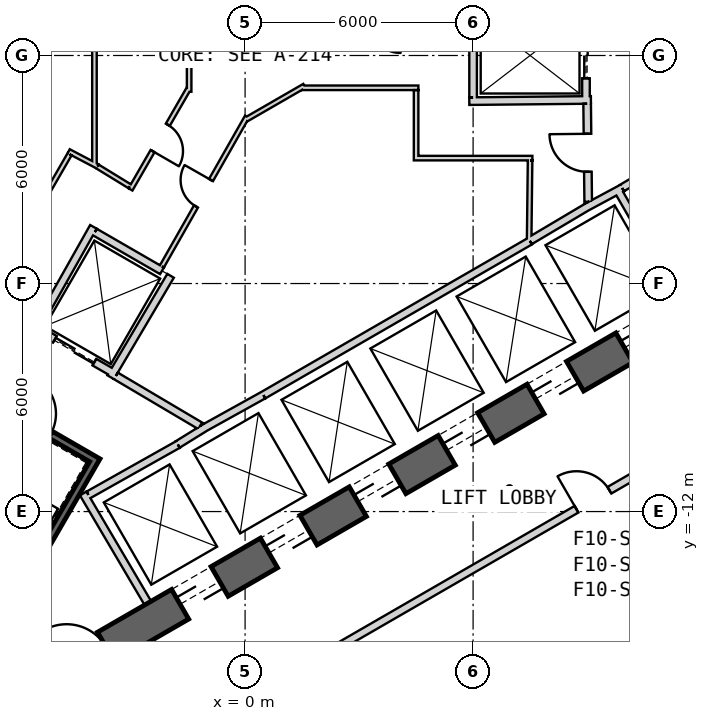
"""IFC4 building model, lengths in metres.
Left out: names, types, materials, properties, quantities, classifications, styles, units other than length and angle.
Written with IfcOpenShell. Run it as: python <this file> out.ifc"""

import sys

from ifc_helpers import new_model, si_unit, direction, frame, frame_2d, origin, place, context, subcontext, project, spatial, rectangle, extrude, element, fill, save


model = new_model("IFC4")
c1 = context("Model", 3, precision=1e-05, world=origin(), true_north=direction((0.0, 1.0)))
c2 = subcontext(c1, "Body", "Model", "MODEL_VIEW")
j1 = project(units=[si_unit("LENGTHUNIT", "METRE"), si_unit("PLANEANGLEUNIT", "RADIAN")], contexts=[c1])
p1 = place(None, origin())
s1 = spatial("IfcSite", under=j1, at=p1, CompositionType="ELEMENT")
p2 = place(p1, origin())
s2 = spatial("IfcBuilding", under=s1, at=p2, CompositionType="ELEMENT")
p3 = place(p2, frame((0.0, 0.0, 94.7)))
s3 = spatial("IfcBuildingStorey", under=s2, at=p3, CompositionType="ELEMENT", Elevation=94.7)
p4 = place(p3, frame((-7.825, -17.97, 0.0), z_axis=(0.0, 0.0, 1.0), x_axis=(0.866028369851, 0.499994862586, 0.0)))
e1 = element("IfcWall", 1, at=p4, inside=s3, PredefinedType="SHEAR", context=c2, shape_type="SweptSolid", body=[
    extrude(rectangle(XDim=31.523, YDim=0.9, at=frame_2d((15.762, 0.0))), origin(), (0.0, 0.0, 1.0), 4.1),
])
p5 = place(p4, frame((7.062, 0.0, 0.0)))
e2 = element("IfcOpeningElement", 2, at=p5, cuts=e1, PredefinedType="OPENING", context=c2, shape_type="SweptSolid", body=[
    extrude(rectangle(XDim=1.2, YDim=2.4, at=frame_2d((0.6, 1.2))), frame((0.0, 0.46, 0.0), z_axis=(0.0, -1.0, 0.0), x_axis=(1.0, 0.0, 0.0)), (0.0, 0.0, 1.0), 0.92),
])
p6 = place(p4, frame((9.762, 0.0, 0.0)))
e3 = element("IfcOpeningElement", 3, at=p6, cuts=e1, PredefinedType="OPENING", context=c2, shape_type="SweptSolid", body=[
    extrude(rectangle(XDim=1.2, YDim=2.4, at=frame_2d((0.6, 1.2))), frame((0.0, 0.46, 0.0), z_axis=(0.0, -1.0, 0.0), x_axis=(1.0, 0.0, 0.0)), (0.0, 0.0, 1.0), 0.92),
])
p7 = place(p4, frame((12.462, 0.0, 0.0)))
e4 = element("IfcOpeningElement", 4, at=p7, cuts=e1, PredefinedType="OPENING", context=c2, shape_type="SweptSolid", body=[
    extrude(rectangle(XDim=1.2, YDim=2.4, at=frame_2d((0.6, 1.2))), frame((0.0, 0.46, 0.0), z_axis=(0.0, -1.0, 0.0), x_axis=(1.0, 0.0, 0.0)), (0.0, 0.0, 1.0), 0.92),
])
p8 = place(p4, frame((15.162, 0.0, 0.0)))
e5 = element("IfcOpeningElement", 5, at=p8, cuts=e1, PredefinedType="OPENING", context=c2, shape_type="SweptSolid", body=[
    extrude(rectangle(XDim=1.2, YDim=2.4, at=frame_2d((0.6, 1.2))), frame((0.0, 0.46, 0.0), z_axis=(0.0, -1.0, 0.0), x_axis=(1.0, 0.0, 0.0)), (0.0, 0.0, 1.0), 0.92),
])
p9 = place(p4, frame((17.862, 0.0, 0.0)))
e6 = element("IfcOpeningElement", 6, at=p9, cuts=e1, PredefinedType="OPENING", context=c2, shape_type="SweptSolid", body=[
    extrude(rectangle(XDim=1.2, YDim=2.4, at=frame_2d((0.6, 1.2))), frame((0.0, 0.46, 0.0), z_axis=(0.0, -1.0, 0.0), x_axis=(1.0, 0.0, 0.0)), (0.0, 0.0, 1.0), 0.92),
])
p10 = place(p4, frame((20.562, 0.0, 0.0)))
e7 = element("IfcOpeningElement", 7, at=p10, cuts=e1, PredefinedType="OPENING", context=c2, shape_type="SweptSolid", body=[
    extrude(rectangle(XDim=1.2, YDim=2.4, at=frame_2d((0.6, 1.2))), frame((0.0, 0.46, 0.0), z_axis=(0.0, -1.0, 0.0), x_axis=(1.0, 0.0, 0.0)), (0.0, 0.0, 1.0), 0.92),
])
p11 = place(p4, frame((26.712, 0.0, 0.0)))
e8 = element("IfcOpeningElement", 8, at=p11, cuts=e1, PredefinedType="OPENING", context=c2, shape_type="SweptSolid", body=[
    extrude(rectangle(XDim=1.2, YDim=2.4, at=frame_2d((0.6, 1.2))), frame((0.0, 0.46, 0.0), z_axis=(0.0, -1.0, 0.0), x_axis=(1.0, 0.0, 0.0)), (0.0, 0.0, 1.0), 0.92),
])
p12 = place(p4, frame((3.612, 0.0, 0.0)))
e9 = element("IfcOpeningElement", 9, at=p12, cuts=e1, PredefinedType="OPENING", context=c2, shape_type="SweptSolid", body=[
    extrude(rectangle(XDim=1.2, YDim=2.4, at=frame_2d((0.6, 1.2))), frame((0.0, 0.46, 0.0), z_axis=(0.0, -1.0, 0.0), x_axis=(1.0, 0.0, 0.0)), (0.0, 0.0, 1.0), 0.92),
])
p13 = place(p3, frame((0.483, -8.936, 0.0), z_axis=(0.0, 0.0, 1.0), x_axis=(0.866030989016, 0.499990325971, 0.0)))
e10 = element("IfcWall", 10, at=p13, inside=s3, PredefinedType="PLUMBINGWALL", context=c2, shape_type="SweptSolid", body=[
    extrude(rectangle(XDim=8.1, YDim=0.2, at=frame_2d((4.05, 0.0))), origin(), (0.0, 0.0, 1.0), 3.8),
])
p14 = place(p3, frame((9.795, -3.525, 0.0), z_axis=(0.0, 0.0, 1.0), x_axis=(0.499984717929, -0.866034226713, 0.0)))
e11 = element("IfcWall", 11, at=p14, inside=s3, PredefinedType="PLUMBINGWALL", context=c2, shape_type="SweptSolid", body=[
    extrude(rectangle(XDim=3.25, YDim=0.2, at=frame_2d((1.625, 0.0))), origin(), (0.0, 0.0, 1.0), 3.8),
])
p15 = place(p3, frame((8.974, -3.999, 0.0), z_axis=(0.0, 0.0, 1.0), x_axis=(0.880907015104, 0.473289373154, 0.0)))
e12 = element("IfcWall", 12, at=p15, inside=s3, PredefinedType="PLUMBINGWALL", context=c2, shape_type="SweptSolid", body=[
    extrude(rectangle(XDim=1.078, YDim=0.2, at=frame_2d((0.539, 0.0))), origin(), (0.0, 0.0, 1.0), 3.8),
])
p16 = place(p3, frame((7.493, -4.878, 0.0), z_axis=(0.0, 0.0, 1.0), x_axis=(0.859981807212, 0.510324691999, 0.0)))
e13 = element("IfcWall", 13, at=p16, inside=s3, PredefinedType="PLUMBINGWALL", context=c2, shape_type="SweptSolid", body=[
    extrude(rectangle(XDim=1.845, YDim=0.2, at=frame_2d((0.922, 0.0))), origin(), (0.0, 0.0, 1.0), 3.8),
])
p17 = place(p3, frame((-2.558, -14.409, 0.0), z_axis=(0.0, 0.0, 1.0), x_axis=(-0.507997497166, 0.861358544901, 0.0)))
e14 = element("IfcWall", 14, at=p17, inside=s3, PredefinedType="PLUMBINGWALL", context=c2, shape_type="SweptSolid", body=[
    extrude(rectangle(XDim=3.35, YDim=0.2, at=frame_2d((1.675, 0.0))), origin(), (0.0, 0.0, 1.0), 3.8),
])
p18 = place(p3, frame((-1.769, -10.237, 0.0), z_axis=(0.0, 0.0, 1.0), x_axis=(-0.871534483978, -0.490334215854, 0.0)))
e15 = element("IfcWall", 15, at=p18, inside=s3, PredefinedType="PLUMBINGWALL", context=c2, shape_type="SweptSolid", body=[
    extrude(rectangle(XDim=2.7, YDim=0.2, at=frame_2d((1.35, 0.0))), origin(), (0.0, 0.0, 1.0), 3.8),
])
p19 = place(p3, frame((-1.024, -9.771, 0.0), z_axis=(0.0, 0.0, 1.0), x_axis=(-0.850348075135, -0.526220629693, 0.0)))
e16 = element("IfcWall", 16, at=p19, inside=s3, PredefinedType="PLUMBINGWALL", context=c2, shape_type="SweptSolid", body=[
    extrude(rectangle(XDim=0.878, YDim=0.2, at=frame_2d((0.439, 0.0))), origin(), (0.0, 0.0, 1.0), 3.8),
])
p20 = place(p3, frame((-1.13, -9.831, 0.0), z_axis=(0.0, 0.0, 1.0), x_axis=(0.874269620932, 0.485440655401, 0.0)))
e17 = element("IfcWall", 17, at=p20, inside=s3, PredefinedType="PLUMBINGWALL", context=c2, shape_type="SweptSolid", body=[
    extrude(rectangle(XDim=1.845, YDim=0.2, at=frame_2d((0.922, 0.0))), origin(), (0.0, 0.0, 1.0), 3.8),
])
p21 = place(p3, frame((8.97, 1.2, 0.0), z_axis=(0.0, 0.0, 1.0), x_axis=(0.0, -1.0, 0.0)))
e18 = element("IfcWall", 18, at=p21, inside=s3, PredefinedType="PLUMBINGWALL", context=c2, shape_type="SweptSolid", body=[
    extrude(rectangle(XDim=2.4, YDim=0.2, at=frame_2d((1.2, 0.0))), origin(), (0.0, 0.0, 1.0), 3.8),
])
p22 = place(p21, frame((0.6, 0.0, 0.0)))
e19 = element("IfcOpeningElement", 19, at=p22, cuts=e18, PredefinedType="OPENING", context=c2, shape_type="SweptSolid", body=[
    extrude(rectangle(XDim=1.2, YDim=2.4, at=frame_2d((0.6, 1.2))), frame((0.0, 0.11, 0.0), z_axis=(0.0, -1.0, 0.0), x_axis=(1.0, 0.0, 0.0)), (0.0, 0.0, 1.0), 0.22),
])
p23 = place(p3, frame((5.9, -1.201, 0.0), z_axis=(0.0, 0.0, 1.0), x_axis=(0.999950064753, 0.009993397809, 0.0)))
e20 = element("IfcWall", 20, at=p23, inside=s3, PredefinedType="PLUMBINGWALL", context=c2, shape_type="SweptSolid", body=[
    extrude(rectangle(XDim=3.2, YDim=0.2, at=frame_2d((1.6, 0.0))), origin(), (0.0, 0.0, 1.0), 3.8),
])
p24 = place(p3, frame((6.0, -1.1, 0.0), z_axis=(0.0, 0.0, 1.0), x_axis=(0.0, 1.0, 0.0)))
e21 = element("IfcWall", 21, at=p24, inside=s3, PredefinedType="PLUMBINGWALL", context=c2, shape_type="SweptSolid", body=[
    extrude(rectangle(XDim=2.055, YDim=0.2, at=frame_2d((1.027, 0.0))), origin(), (0.0, 0.0, 1.0), 3.8),
])
p25 = place(p3, frame((-3.905, -10.563, -0.3), z_axis=(0.0, 0.0, 1.0), x_axis=(-0.500012932018, -0.866017937352, 0.0)))
e22 = element("IfcWall", 22, at=p25, inside=s3, PredefinedType="SHEAR", context=c2, shape_type="SweptSolid", body=[
    extrude(rectangle(XDim=8.1, YDim=0.2, at=frame_2d((4.05, 0.0))), origin(), (0.0, 0.0, 1.0), 4.1),
])
p26 = place(p3, frame((-4.041, -10.599, -0.3), z_axis=(0.0, 0.0, 1.0), x_axis=(-0.866047807691, 0.499961193289, 0.0)))
e23 = element("IfcWall", 23, at=p26, inside=s3, PredefinedType="SHEAR", context=c2, shape_type="SweptSolid", body=[
    extrude(rectangle(XDim=3.6, YDim=0.2, at=frame_2d((1.8, 0.0))), origin(), (0.0, 0.0, 1.0), 4.1),
])
p27 = place(p26, frame((1.25, 0.0, 0.3)))
e24 = element("IfcOpeningElement", 24, at=p27, cuts=e23, PredefinedType="OPENING", context=c2, shape_type="SweptSolid", body=[
    extrude(rectangle(XDim=1.1, YDim=2.1, at=frame_2d((0.55, 1.05))), frame((0.0, 0.11, 0.0), z_axis=(0.0, -1.0, 0.0), x_axis=(1.0, 0.0, 0.0)), (0.0, 0.0, 1.0), 0.22),
])
p28 = place(p3, frame((-3.446, -8.368, 0.0), z_axis=(0.0, 0.0, 1.0), x_axis=(-0.866024647952, 0.500001309137, 0.0)))
e25 = element("IfcWall", 25, at=p28, inside=s3, PredefinedType="PLUMBINGWALL", context=c2, shape_type="SweptSolid", body=[
    extrude(rectangle(XDim=2.4, YDim=0.2, at=frame_2d((1.2, 0.0))), origin(), (0.0, 0.0, 1.0), 3.8),
])
p29 = place(p28, frame((0.6, 0.0, 0.0)))
e26 = element("IfcOpeningElement", 26, at=p29, cuts=e25, PredefinedType="OPENING", context=c2, shape_type="SweptSolid", body=[
    extrude(rectangle(XDim=1.2, YDim=2.4, at=frame_2d((0.6, 1.2))), frame((0.0, 0.11, 0.0), z_axis=(0.0, -1.0, 0.0), x_axis=(1.0, 0.0, 0.0)), (0.0, 0.0, 1.0), 0.22),
])
p30 = place(p3, frame((-1.961, -5.796, 0.0), z_axis=(0.0, 0.0, 1.0), x_axis=(-0.508647062354, -0.860975125052, 0.0)))
e27 = element("IfcWall", 27, at=p30, inside=s3, PredefinedType="PLUMBINGWALL", context=c2, shape_type="SweptSolid", body=[
    extrude(rectangle(XDim=3.1, YDim=0.2, at=frame_2d((1.55, 0.0))), origin(), (0.0, 0.0, 1.0), 3.8),
])
p31 = place(p3, frame((-3.99, -4.509, 0.0), z_axis=(0.0, 0.0, 1.0), x_axis=(-0.491358283181, -0.870957540612, 0.0)))
e28 = element("IfcWall", 28, at=p31, inside=s3, PredefinedType="PLUMBINGWALL", context=c2, shape_type="SweptSolid", body=[
    extrude(rectangle(XDim=3.2, YDim=0.2, at=frame_2d((1.6, 0.0))), origin(), (0.0, 0.0, 1.0), 3.8),
])
p32 = place(p3, frame((-3.953, -4.646, 0.0), z_axis=(0.0, 0.0, 1.0), x_axis=(0.866032100247, -0.499988401207, 0.0)))
e29 = element("IfcWall", 29, at=p32, inside=s3, PredefinedType="PLUMBINGWALL", context=c2, shape_type="SweptSolid", body=[
    extrude(rectangle(XDim=2.04, YDim=0.2, at=frame_2d((1.02, 0.0))), origin(), (0.0, 0.0, 1.0), 3.8),
])
p33 = place(p3, frame((12.245, -2.109, 0.0), z_axis=(0.0, 0.0, 1.0), x_axis=(-0.860414880418, -0.509594185166, 0.0)))
e30 = element("IfcWall", 30, at=p33, inside=s3, PredefinedType="PARTITIONING", context=c2, shape_type="SweptSolid", body=[
    extrude(rectangle(XDim=2.7, YDim=0.2, at=frame_2d((1.35, 0.0))), origin(), (0.0, 0.0, 1.0), 3.8),
])
p34 = place(p3, frame((9.029, -3.851, 0.0), z_axis=(0.0, 0.0, 1.0), x_axis=(-0.010783593937, 0.99994185536, 0.0)))
e31 = element("IfcWall", 31, at=p34, inside=s3, PredefinedType="PARTITIONING", context=c2, shape_type="SweptSolid", body=[
    extrude(rectangle(XDim=2.581, YDim=0.2, at=frame_2d((1.291, 0.0))), origin(), (0.0, 0.0, 1.0), 3.8),
])
p35 = place(p34, frame((0.791, 0.0, 0.0)))
e32 = element("IfcOpeningElement", 32, at=p35, cuts=e31, PredefinedType="OPENING", context=c2, shape_type="SweptSolid", body=[
    extrude(rectangle(XDim=1.0, YDim=2.1, at=frame_2d((0.5, 1.05))), frame((0.0, 0.11, 0.0), z_axis=(0.0, -1.0, 0.0), x_axis=(1.0, 0.0, 0.0)), (0.0, 0.0, 1.0), 0.22),
])
p36 = place(p3, frame((-3.401, -8.43, 0.0), z_axis=(0.0, 0.0, 1.0), x_axis=(0.860615607571, -0.509255118781, 0.0)))
e33 = element("IfcWall", 33, at=p36, inside=s3, PredefinedType="PARTITIONING", context=c2, shape_type="SweptSolid", body=[
    extrude(rectangle(XDim=2.581, YDim=0.2, at=frame_2d((1.29, 0.0))), origin(), (0.0, 0.0, 1.0), 3.8),
])
p37 = place(p3, frame((0.051, -1.611, 0.0), z_axis=(0.0, 0.0, 1.0), x_axis=(-0.49434454467, -0.869266053148, 0.0)))
e34 = element("IfcWall", 34, at=p37, inside=s3, PredefinedType="PARTITIONING", context=c2, shape_type="SweptSolid", body=[
    extrude(rectangle(XDim=4.53, YDim=0.12, at=frame_2d((2.265, 0.0))), origin(), (0.0, 0.0, 1.0), 3.8),
])
p38 = place(p37, frame((1.916, 0.0, 0.0)))
e35 = element("IfcOpeningElement", 35, at=p38, cuts=e34, PredefinedType="OPENING", context=c2, shape_type="SweptSolid", body=[
    extrude(rectangle(XDim=0.8, YDim=2.1, at=frame_2d((0.4, 1.05))), frame((0.0, 0.07, 0.0), z_axis=(0.0, -1.0, 0.0), x_axis=(1.0, 0.0, 0.0)), (0.0, 0.0, 1.0), 0.14),
])
p39 = place(p3, frame((1.562, -0.798, 0.0), z_axis=(0.0, 0.0, 1.0), x_axis=(-0.86601248742, -0.500022371132, 0.0)))
e36 = element("IfcWall", 36, at=p39, inside=s3, PredefinedType="PARTITIONING", context=c2, shape_type="SweptSolid", body=[
    extrude(rectangle(XDim=1.785, YDim=0.12, at=frame_2d((0.893, 0.0))), origin(), (0.0, 0.0, 1.0), 3.8),
])
p40 = place(p3, frame((4.56, -0.85, 0.0), z_axis=(0.0, 0.0, 1.0), x_axis=(-1.0, 0.0, 0.0)))
e37 = element("IfcWall", 37, at=p40, inside=s3, PredefinedType="PARTITIONING", context=c2, shape_type="SweptSolid", body=[
    extrude(rectangle(XDim=3.069, YDim=0.12, at=frame_2d((1.535, 0.0))), origin(), (0.0, 0.0, 1.0), 3.8),
])
p41 = place(p3, frame((4.5, -2.76, 0.0), z_axis=(0.0, 0.0, 1.0), x_axis=(0.0, 1.0, 0.0)))
e38 = element("IfcWall", 38, at=p41, inside=s3, PredefinedType="PARTITIONING", context=c2, shape_type="SweptSolid", body=[
    extrude(rectangle(XDim=1.85, YDim=0.12, at=frame_2d((0.925, 0.0))), origin(), (0.0, 0.0, 1.0), 3.8),
])
p42 = place(p3, frame((7.56, -2.7, 0.0), z_axis=(0.0, 0.0, 1.0), x_axis=(-1.0, 0.0, 0.0)))
e39 = element("IfcWall", 39, at=p42, inside=s3, PredefinedType="PARTITIONING", context=c2, shape_type="SweptSolid", body=[
    extrude(rectangle(XDim=3.0, YDim=0.12, at=frame_2d((1.5, 0.0))), origin(), (0.0, 0.0, 1.0), 3.8),
])
p43 = place(p3, frame((7.475, -4.865, 0.0), z_axis=(0.0, 0.0, 1.0), x_axis=(0.011716133148, 0.999931363757, 0.0)))
e40 = element("IfcWall", 40, at=p43, inside=s3, PredefinedType="PARTITIONING", context=c2, shape_type="SweptSolid", body=[
    extrude(rectangle(XDim=2.105, YDim=0.12, at=frame_2d((1.052, 0.0))), origin(), (0.0, 0.0, 1.0), 3.8),
])
p44 = place(p3, frame((-3.964, -2.908, 0.0), z_axis=(0.0, 0.0, 1.0), x_axis=(0.0, 1.0, 0.0)))
e41 = element("IfcWall", 41, at=p44, inside=s3, PredefinedType="PARTITIONING", context=c2, shape_type="SweptSolid", body=[
    extrude(rectangle(XDim=5.815, YDim=0.12, at=frame_2d((2.908, 0.0))), origin(), (0.0, 0.0, 1.0), 3.8),
])
p45 = place(p3, frame((-4.641, -2.519, 0.0), z_axis=(0.0, 0.0, 1.0), x_axis=(0.885386208329, -0.464856173564, 0.0)))
e42 = element("IfcWall", 42, at=p45, inside=s3, PredefinedType="PARTITIONING", context=c2, shape_type="SweptSolid", body=[
    extrude(rectangle(XDim=0.859, YDim=0.12, at=frame_2d((0.43, 0.0))), origin(), (0.0, 0.0, 1.0), 3.8),
])
p46 = place(p3, frame((-6.118, -5.197, 0.0), z_axis=(0.0, 0.0, 1.0), x_axis=(0.499990139034, 0.866031096941, 0.0)))
e43 = element("IfcWall", 43, at=p46, inside=s3, PredefinedType="PARTITIONING", context=c2, shape_type="SweptSolid", body=[
    extrude(rectangle(XDim=3.0, YDim=0.12, at=frame_2d((1.5, 0.0))), origin(), (0.0, 0.0, 1.0), 3.8),
])
p47 = place(p3, frame((-1.472, -0.954, 0.0), z_axis=(0.0, 0.0, 1.0), x_axis=(0.0, 1.0, 0.0)))
e44 = element("IfcWall", 44, at=p47, inside=s3, PredefinedType="PARTITIONING", context=c2, shape_type="SweptSolid", body=[
    extrude(rectangle(XDim=1.785, YDim=0.12, at=frame_2d((0.893, 0.0))), origin(), (0.0, 0.0, 1.0), 3.8),
])
p48 = place(p3, frame((-3.016, -3.524, 0.0), z_axis=(0.0, 0.0, 1.0), x_axis=(0.499988681553, 0.866031938394, 0.0)))
e45 = element("IfcWall", 45, at=p48, inside=s3, PredefinedType="PARTITIONING", context=c2, shape_type="SweptSolid", body=[
    extrude(rectangle(XDim=3.069, YDim=0.12, at=frame_2d((1.535, 0.0))), origin(), (0.0, 0.0, 1.0), 3.8),
])
p49 = place(p48, frame((1.165, 0.0, 0.0)))
e46 = element("IfcOpeningElement", 46, at=p49, cuts=e45, PredefinedType="OPENING", context=c2, shape_type="SweptSolid", body=[
    extrude(rectangle(XDim=0.8, YDim=2.1, at=frame_2d((0.4, 1.05))), frame((0.0, 0.07, 0.0), z_axis=(0.0, -1.0, 0.0), x_axis=(1.0, 0.0, 0.0)), (0.0, 0.0, 1.0), 0.14),
])
p50 = place(p3, frame((-3.883, -2.922, 0.0), z_axis=(0.0, 0.0, 1.0), x_axis=(0.852477364208, -0.522764137554, 0.0)))
e47 = element("IfcWall", 47, at=p50, inside=s3, PredefinedType="PARTITIONING", context=c2, shape_type="SweptSolid", body=[
    extrude(rectangle(XDim=0.991, YDim=0.12, at=frame_2d((0.496, 0.0))), origin(), (0.0, 0.0, 1.0), 3.8),
])
p51 = place(p3, frame((-3.072, -18.747, 0.0), z_axis=(0.0, 0.0, 1.0), x_axis=(0.866027760718, 0.499995917648, 0.0)))
e48 = element("IfcWall", 48, at=p51, inside=s3, PredefinedType="PARTITIONING", context=c2, shape_type="SweptSolid", body=[
    extrude(rectangle(XDim=28.233, YDim=0.2, at=frame_2d((14.117, 0.0))), origin(), (0.0, 0.0, 1.0), 2.98),
])
p52 = place(p51, frame((13.617, 0.0, 0.0)))
e49 = element("IfcOpeningElement", 49, at=p52, cuts=e48, PredefinedType="OPENING", context=c2, shape_type="SweptSolid", body=[
    extrude(rectangle(XDim=1.0, YDim=2.1, at=frame_2d((0.5, 1.05))), frame((0.0, 0.11, 0.0), z_axis=(0.0, -1.0, 0.0), x_axis=(1.0, 0.0, 0.0)), (0.0, 0.0, 1.0), 0.22),
])
p53 = place(p35, origin())
e50 = element("IfcDoor", 50, at=p53, inside=s3, OperationType="SINGLE_SWING_RIGHT", PredefinedType="USERDEFINED", context=c2, shape_type="SweptSolid", body=[
    extrude(rectangle(XDim=1.0, YDim=2.1, at=frame_2d((0.5, 1.05))), frame((0.0, 0.025, 0.0), z_axis=(0.0, -1.0, 0.0), x_axis=(1.0, 0.0, 0.0)), (0.0, 0.0, 1.0), 0.05),
])
fill(e32, e50)
p54 = place(p22, origin())
e51 = element("IfcDoor", 51, at=p54, inside=s3, OperationType="SLIDING_TO_LEFT", PredefinedType="USERDEFINED", context=c2, shape_type="SweptSolid", body=[
    extrude(rectangle(XDim=1.2, YDim=2.4, at=frame_2d((0.6, 1.2))), frame((0.0, 0.025, 0.0), z_axis=(0.0, -1.0, 0.0), x_axis=(1.0, 0.0, 0.0)), (0.0, 0.0, 1.0), 0.05),
])
fill(e19, e51)
p55 = place(p29, origin())
e52 = element("IfcDoor", 52, at=p55, inside=s3, OperationType="SLIDING_TO_LEFT", PredefinedType="USERDEFINED", context=c2, shape_type="SweptSolid", body=[
    extrude(rectangle(XDim=1.2, YDim=2.4, at=frame_2d((0.6, 1.2))), frame((0.0, 0.025, 0.0), z_axis=(0.0, -1.0, 0.0), x_axis=(1.0, 0.0, 0.0)), (0.0, 0.0, 1.0), 0.05),
])
fill(e26, e52)
p56 = place(p38, origin())
e53 = element("IfcDoor", 53, at=p56, inside=s3, OperationType="SINGLE_SWING_RIGHT", PredefinedType="USERDEFINED", context=c2, shape_type="SweptSolid", body=[
    extrude(rectangle(XDim=0.8, YDim=2.1, at=frame_2d((0.4, 1.05))), frame((0.0, 0.025, 0.0), z_axis=(0.0, -1.0, 0.0), x_axis=(1.0, 0.0, 0.0)), (0.0, 0.0, 1.0), 0.05),
])
fill(e35, e53)
p57 = place(p49, origin())
e54 = element("IfcDoor", 54, at=p57, inside=s3, OperationType="SINGLE_SWING_LEFT", PredefinedType="USERDEFINED", context=c2, shape_type="SweptSolid", body=[
    extrude(rectangle(XDim=0.8, YDim=2.1, at=frame_2d((0.4, 1.05))), frame((0.0, 0.025, 0.0), z_axis=(0.0, -1.0, 0.0), x_axis=(1.0, 0.0, 0.0)), (0.0, 0.0, 1.0), 0.05),
])
fill(e46, e54)
p58 = place(p52, origin())
e55 = element("IfcDoor", 55, at=p58, inside=s3, OperationType="SINGLE_SWING_RIGHT", PredefinedType="USERDEFINED", context=c2, shape_type="SweptSolid", body=[
    extrude(rectangle(XDim=1.0, YDim=2.1, at=frame_2d((0.5, 1.05))), frame((0.0, 0.025, 0.0), z_axis=(0.0, -1.0, 0.0), x_axis=(1.0, 0.0, 0.0)), (0.0, 0.0, 1.0), 0.05),
])
fill(e49, e55)
p59 = place(p5, origin())
e56 = element("IfcDoor", 56, at=p59, inside=s3, OperationType="SLIDING_TO_LEFT", PredefinedType="USERDEFINED", context=c2, shape_type="SweptSolid", body=[
    extrude(rectangle(XDim=1.2, YDim=2.4, at=frame_2d((0.6, 1.2))), frame((0.0, 0.025, 0.0), z_axis=(0.0, -1.0, 0.0), x_axis=(1.0, 0.0, 0.0)), (0.0, 0.0, 1.0), 0.05),
])
fill(e2, e56)
p60 = place(p6, origin())
e57 = element("IfcDoor", 57, at=p60, inside=s3, OperationType="SLIDING_TO_LEFT", PredefinedType="USERDEFINED", context=c2, shape_type="SweptSolid", body=[
    extrude(rectangle(XDim=1.2, YDim=2.4, at=frame_2d((0.6, 1.2))), frame((0.0, 0.025, 0.0), z_axis=(0.0, -1.0, 0.0), x_axis=(1.0, 0.0, 0.0)), (0.0, 0.0, 1.0), 0.05),
])
fill(e3, e57)
p61 = place(p7, origin())
e58 = element("IfcDoor", 58, at=p61, inside=s3, OperationType="SLIDING_TO_LEFT", PredefinedType="USERDEFINED", context=c2, shape_type="SweptSolid", body=[
    extrude(rectangle(XDim=1.2, YDim=2.4, at=frame_2d((0.6, 1.2))), frame((0.0, 0.025, 0.0), z_axis=(0.0, -1.0, 0.0), x_axis=(1.0, 0.0, 0.0)), (0.0, 0.0, 1.0), 0.05),
])
fill(e4, e58)
p62 = place(p8, origin())
e59 = element("IfcDoor", 59, at=p62, inside=s3, OperationType="SLIDING_TO_LEFT", PredefinedType="USERDEFINED", context=c2, shape_type="SweptSolid", body=[
    extrude(rectangle(XDim=1.2, YDim=2.4, at=frame_2d((0.6, 1.2))), frame((0.0, 0.025, 0.0), z_axis=(0.0, -1.0, 0.0), x_axis=(1.0, 0.0, 0.0)), (0.0, 0.0, 1.0), 0.05),
])
fill(e5, e59)
p63 = place(p9, origin())
e60 = element("IfcDoor", 60, at=p63, inside=s3, OperationType="SLIDING_TO_LEFT", PredefinedType="USERDEFINED", context=c2, shape_type="SweptSolid", body=[
    extrude(rectangle(XDim=1.2, YDim=2.4, at=frame_2d((0.6, 1.2))), frame((0.0, 0.025, 0.0), z_axis=(0.0, -1.0, 0.0), x_axis=(1.0, 0.0, 0.0)), (0.0, 0.0, 1.0), 0.05),
])
fill(e6, e60)
p64 = place(p10, origin())
e61 = element("IfcDoor", 61, at=p64, inside=s3, OperationType="SLIDING_TO_LEFT", PredefinedType="USERDEFINED", context=c2, shape_type="SweptSolid", body=[
    extrude(rectangle(XDim=1.2, YDim=2.4, at=frame_2d((0.6, 1.2))), frame((0.0, 0.025, 0.0), z_axis=(0.0, -1.0, 0.0), x_axis=(1.0, 0.0, 0.0)), (0.0, 0.0, 1.0), 0.05),
])
fill(e7, e61)
save(model, sys.argv[1])
